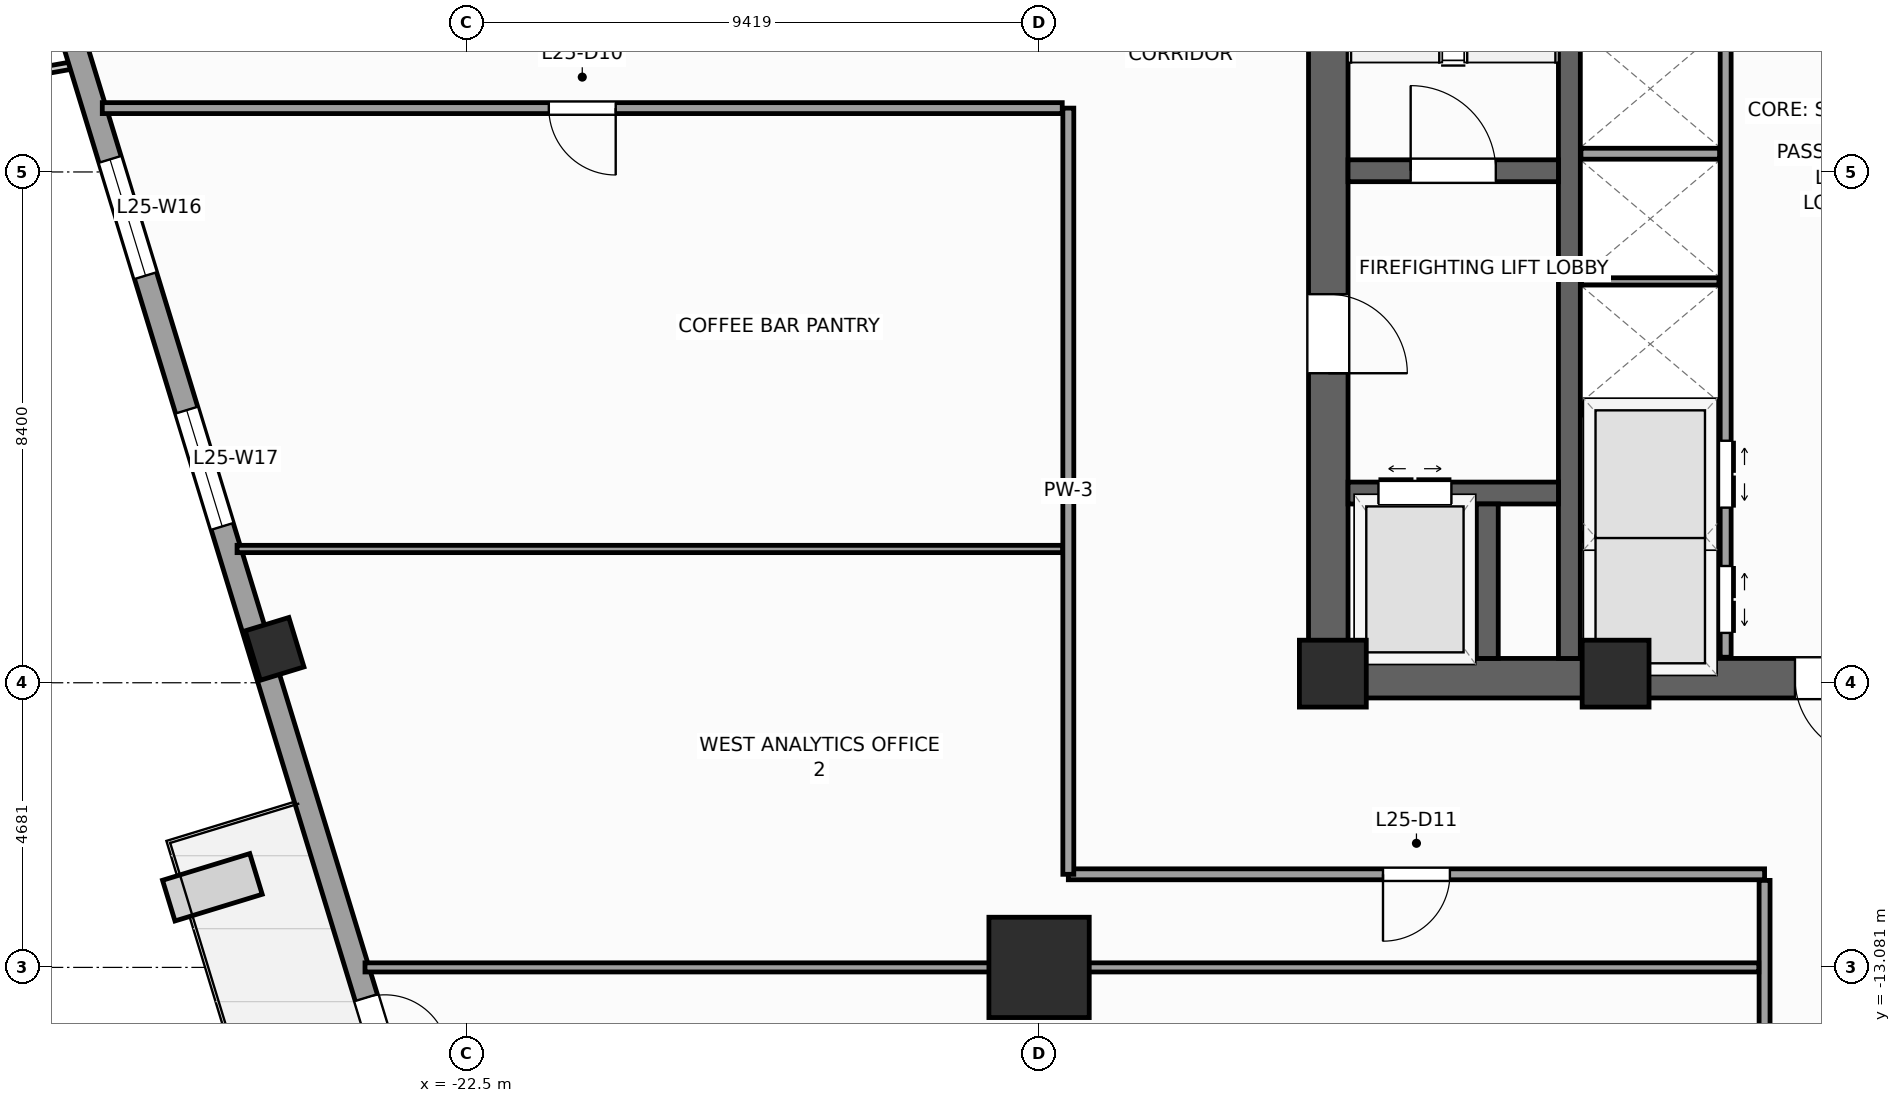
"""IFC4 building model, lengths in metres.
Left out: names, types, materials, properties, quantities, classifications, styles, units other than length and angle.
Written with IfcOpenShell. Run it as: python <this file> out.ifc"""

import sys

from ifc_helpers import new_model, si_unit, direction, frame, frame_2d, origin, origin_2d, place, context, subcontext, project, spatial, rectangle, extrude, source, transform, mapped, element, fill, save


model = new_model("IFC4")
c1 = context("Model", 3, precision=1e-05, world=origin(), true_north=direction((0.0, 1.0)))
c2 = subcontext(c1, "Body", "Model", "MODEL_VIEW")
j1 = project(units=[si_unit("LENGTHUNIT", "METRE"), si_unit("PLANEANGLEUNIT", "RADIAN")], contexts=[c1])
p1 = place(None, origin())
s1 = spatial("IfcSite", under=j1, at=p1, CompositionType="ELEMENT")
p2 = place(p1, origin())
s2 = spatial("IfcBuilding", under=s1, at=p2, CompositionType="ELEMENT")
p3 = place(p2, frame((0.0, 0.0, 107.2)))
s3 = spatial("IfcBuildingStorey", under=s2, at=p3, CompositionType="ELEMENT", Elevation=107.2)
p4 = place(p3, frame((-8.65, -8.325, 0.0), z_axis=(0.0, 0.0, 1.0), x_axis=(1.0, 0.0, 0.0)))
e1 = element("IfcWall", 1, at=p4, inside=s3, PredefinedType="SHEAR", context=c2, shape_type="SweptSolid", body=[
    extrude(rectangle(XDim=17.3, YDim=0.65, at=frame_2d((8.65, 0.0))), origin(), (0.0, 0.0, 1.0), 4.0),
])
p5 = place(p4, frame((8.0, 0.0, 0.0)))
e2 = element("IfcOpeningElement", 2, at=p5, cuts=e1, PredefinedType="OPENING", context=c2, shape_type="SweptSolid", body=[
    extrude(rectangle(XDim=1.3, YDim=2.2, at=frame_2d((0.65, 1.1))), frame((0.0, 0.335, 0.0), z_axis=(0.0, -1.0, 0.0), x_axis=(1.0, 0.0, 0.0)), (0.0, 0.0, 1.0), 0.67),
])
p6 = place(p3, frame((-8.325, -8.0, 0.0), z_axis=(0.0, 0.0, 1.0), x_axis=(0.0, 1.0, 0.0)))
e3 = element("IfcWall", 3, at=p6, inside=s3, PredefinedType="SHEAR", context=c2, shape_type="SweptSolid", body=[
    extrude(rectangle(XDim=16.0, YDim=0.65, at=frame_2d((8.0, 0.0))), origin(), (0.0, 0.0, 1.0), 4.0),
])
p7 = place(p6, frame((4.69, 0.0, 0.0)))
e4 = element("IfcOpeningElement", 4, at=p7, cuts=e3, PredefinedType="OPENING", context=c2, shape_type="SweptSolid", body=[
    extrude(rectangle(XDim=1.3, YDim=2.2, at=frame_2d((0.65, 1.1))), frame((0.0, 0.335, 0.0), z_axis=(0.0, -1.0, 0.0), x_axis=(1.0, 0.0, 0.0)), (0.0, 0.0, 1.0), 0.67),
])
p8 = place(p3, frame((-4.36, -8.0, 0.0), z_axis=(0.0, 0.0, 1.0), x_axis=(0.0, 1.0, 0.0)))
e5 = element("IfcWall", 5, at=p8, inside=s3, PredefinedType="SHEAR", context=c2, shape_type="SweptSolid", body=[
    extrude(rectangle(XDim=16.0, YDim=0.36, at=frame_2d((8.0, 0.0))), origin(), (0.0, 0.0, 1.0), 4.0),
])
p9 = place(p3, frame((-8.0, 0.02, 0.0), z_axis=(0.0, 0.0, 1.0), x_axis=(1.0, 0.0, 0.0)))
e6 = element("IfcWall", 6, at=p9, inside=s3, PredefinedType="SHEAR", context=c2, shape_type="SweptSolid", body=[
    extrude(rectangle(XDim=3.46, YDim=0.36, at=frame_2d((1.73, 0.0))), origin(), (0.0, 0.0, 1.0), 4.0),
])
p10 = place(p9, frame((1.03, 0.0, 0.0)))
e7 = element("IfcOpeningElement", 7, at=p10, cuts=e6, PredefinedType="OPENING", context=c2, shape_type="SweptSolid", body=[
    extrude(rectangle(XDim=1.4, YDim=2.2, at=frame_2d((0.7, 1.1))), frame((0.0, 0.19, 0.0), z_axis=(0.0, -1.0, 0.0), x_axis=(1.0, 0.0, 0.0)), (0.0, 0.0, 1.0), 0.38),
])
p11 = place(p3, frame((-8.0, -5.28, 0.0), z_axis=(0.0, 0.0, 1.0), x_axis=(1.0, 0.0, 0.0)))
e8 = element("IfcWall", 8, at=p11, inside=s3, PredefinedType="SHEAR", context=c2, shape_type="SweptSolid", body=[
    extrude(rectangle(XDim=3.46, YDim=0.36, at=frame_2d((1.73, 0.0))), origin(), (0.0, 0.0, 1.0), 4.0),
])
p12 = place(p11, frame((0.5, 0.0, 0.0)))
e9 = element("IfcOpeningElement", 9, at=p12, cuts=e8, PredefinedType="OPENING", context=c2, shape_type="SweptSolid", body=[
    extrude(rectangle(XDim=1.2, YDim=2.25, at=frame_2d((0.6, 1.125))), frame((0.0, 0.19, 0.0), z_axis=(0.0, -1.0, 0.0), x_axis=(1.0, 0.0, 0.0)), (0.0, 0.0, 1.0), 0.38),
])
p13 = place(p3, frame((-5.71, -8.0, 0.0), z_axis=(0.0, 0.0, 1.0), x_axis=(0.0, 1.0, 0.0)))
e10 = element("IfcWall", 10, at=p13, inside=s3, PredefinedType="SHEAR", context=c2, shape_type="SweptSolid", body=[
    extrude(rectangle(XDim=2.54, YDim=0.36, at=frame_2d((1.27, 0.0))), origin(), (0.0, 0.0, 1.0), 4.0),
])
m1 = source(origin(), c2, "Body", "SweptSolid", [
    extrude(rectangle(XDim=1.1, YDim=1.1, at=origin_2d()), origin(), (0.0, 0.0, 1.0), 4.0),
])
for number, where, z_axis, x_axis in (
    (11, (-8.25, -8.25, 0.0), (0.0, 0.0, 1.0), (1.0, 0.0, 0.0)),
    (12, (-3.6, -8.25, 0.0), (0.0, 0.0, 1.0), (1.0, 0.0, 0.0)),
):
    element("IfcColumn", number, at=place(p3, frame(where, z_axis=z_axis, x_axis=x_axis)), inside=s3, PredefinedType="PILASTER", context=c2, shape_type="MappedRepresentation", body=[
        mapped(m1, transform((0.0, 0.0, 0.0), scale=1.0)),
    ])
m2 = source(origin(), c2, "Body", "SweptSolid", [
    extrude(rectangle(XDim=1.65, YDim=1.65, at=origin_2d()), origin(), (0.0, 0.0, 1.0), 4.0),
])
p14 = place(p3, frame((-13.081, -13.081, 0.0), z_axis=(0.0, 0.0, 1.0), x_axis=(1.0, 0.0, 0.0)))
e13 = element("IfcColumn", 13, at=p14, inside=s3, PredefinedType="COLUMN", context=c2, shape_type="MappedRepresentation", body=[
    mapped(m2, transform((0.0, 0.0, 0.0), scale=1.0)),
])
m3 = source(origin(), c2, "Body", "SweptSolid", [
    extrude(rectangle(XDim=0.75, YDim=0.85, at=origin_2d()), origin(), (0.0, 0.0, 1.0), 4.0),
])
p15 = place(p3, frame((-25.653, -7.843, 0.0), z_axis=(0.0, 0.0, 1.0), x_axis=(0.956304755963, 0.292371704723, 0.0)))
e14 = element("IfcColumn", 14, at=p15, inside=s3, PredefinedType="COLUMN", context=c2, shape_type="MappedRepresentation", body=[
    mapped(m3, transform((0.0, 0.0, 0.0), scale=1.0)),
])
p16 = place(p3, frame((-32.658, 14.265, 0.0), z_axis=(0.0, 0.0, 1.0), x_axis=(0.292373127906, -0.956304320851, 0.0)))
e15 = element("IfcWall", 15, at=p16, inside=s3, PredefinedType="STANDARD", context=c2, shape_type="SweptSolid", body=[
    extrude(rectangle(XDim=46.38, YDim=0.38, at=frame_2d((23.19, 0.0))), origin(), (0.0, 0.0, 1.0), 3.14),
])
p17 = place(p16, frame((29.115, 0.0, 0.0)))
e16 = element("IfcOpeningElement", 16, at=p17, cuts=e15, PredefinedType="OPENING", context=c2, shape_type="SweptSolid", body=[
    extrude(rectangle(XDim=1.05, YDim=2.25, at=frame_2d((0.525, 1.125))), frame((0.0, 0.2, 0.0), z_axis=(0.0, -1.0, 0.0), x_axis=(1.0, 0.0, 0.0)), (0.0, 0.0, 1.0), 0.4),
])
p18 = place(p16, frame((4.865, 0.0, 0.51)))
e17 = element("IfcOpeningElement", 17, at=p18, cuts=e15, PredefinedType="OPENING", context=c2, shape_type="SweptSolid", body=[
    extrude(rectangle(XDim=1.4, YDim=2.4, at=frame_2d((0.7, 1.2))), frame((0.0, 0.2, 0.0), z_axis=(0.0, -1.0, 0.0), x_axis=(1.0, 0.0, 0.0)), (0.0, 0.0, 1.0), 0.4),
])
p19 = place(p16, frame((14.7, 0.0, 0.51)))
e18 = element("IfcOpeningElement", 18, at=p19, cuts=e15, PredefinedType="OPENING", context=c2, shape_type="SweptSolid", body=[
    extrude(rectangle(XDim=2.0, YDim=2.4, at=frame_2d((1.0, 1.2))), frame((0.0, 0.2, 0.0), z_axis=(0.0, -1.0, 0.0), x_axis=(1.0, 0.0, 0.0)), (0.0, 0.0, 1.0), 0.4),
])
p20 = place(p16, frame((19.012, 0.0, 0.51)))
e19 = element("IfcOpeningElement", 19, at=p20, cuts=e15, PredefinedType="OPENING", context=c2, shape_type="SweptSolid", body=[
    extrude(rectangle(XDim=2.0, YDim=2.4, at=frame_2d((1.0, 1.2))), frame((0.0, 0.2, 0.0), z_axis=(0.0, -1.0, 0.0), x_axis=(1.0, 0.0, 0.0)), (0.0, 0.0, 1.0), 0.4),
])
p21 = place(p16, frame((31.288, 0.0, 0.51)))
e20 = element("IfcOpeningElement", 20, at=p21, cuts=e15, PredefinedType="OPENING", context=c2, shape_type="SweptSolid", body=[
    extrude(rectangle(XDim=2.0, YDim=2.4, at=frame_2d((1.0, 1.2))), frame((0.0, 0.2, 0.0), z_axis=(0.0, -1.0, 0.0), x_axis=(1.0, 0.0, 0.0)), (0.0, 0.0, 1.0), 0.4),
])
p22 = place(p16, frame((39.187, 0.0, 0.51)))
e21 = element("IfcOpeningElement", 21, at=p22, cuts=e15, PredefinedType="OPENING", context=c2, shape_type="SweptSolid", body=[
    extrude(rectangle(XDim=1.4, YDim=2.4, at=frame_2d((0.7, 1.2))), frame((0.0, 0.2, 0.0), z_axis=(0.0, -1.0, 0.0), x_axis=(1.0, 0.0, 0.0)), (0.0, 0.0, 1.0), 0.4),
])
p23 = place(p3, frame((-1.79, -7.98, 0.0), z_axis=(0.0, 0.0, 1.0), x_axis=(0.0, 1.0, 0.0)))
e22 = element("IfcWall", 22, at=p23, inside=s3, PredefinedType="PARTITIONING", context=c2, shape_type="SweptSolid", body=[
    extrude(rectangle(XDim=12.38, YDim=0.18, at=frame_2d((6.19, 0.0))), origin(), (0.0, 0.0, 1.0), 3.74),
])
p24 = place(p23, frame((0.4, 0.0, 0.0)))
e23 = element("IfcOpeningElement", 23, at=p24, cuts=e22, PredefinedType="OPENING", context=c2, shape_type="SweptSolid", body=[
    extrude(rectangle(XDim=1.1, YDim=2.2, at=frame_2d((0.55, 1.1))), frame((0.0, 0.1, 0.0), z_axis=(0.0, -1.0, 0.0), x_axis=(1.0, 0.0, 0.0)), (0.0, 0.0, 1.0), 0.2),
])
p25 = place(p23, frame((2.46, 0.0, 0.0)))
e24 = element("IfcOpeningElement", 24, at=p25, cuts=e22, PredefinedType="OPENING", context=c2, shape_type="SweptSolid", body=[
    extrude(rectangle(XDim=1.1, YDim=2.2, at=frame_2d((0.55, 1.1))), frame((0.0, 0.1, 0.0), z_axis=(0.0, -1.0, 0.0), x_axis=(1.0, 0.0, 0.0)), (0.0, 0.0, 1.0), 0.2),
])
for number, where, z_axis, x_axis in (
    (25, (-4.17, -3.9, 0.0), (0.0, 0.0, 1.0), (1.0, 0.0, 0.0)),
    (26, (-4.17, 0.3, 0.0), (0.0, 0.0, 1.0), (1.0, 0.0, 0.0)),
):
    element("IfcWall", number, at=place(p3, frame(where, z_axis=z_axis, x_axis=x_axis)), inside=s3, PredefinedType="PARTITIONING", context=c2, shape_type="SweptSolid", body=[
        extrude(rectangle(XDim=2.28, YDim=0.18, at=frame_2d((1.14, 0.0))), origin(), (0.0, 0.0, 1.0), 3.74),
    ])
for number, where, z_axis, x_axis in (
    (27, (-4.16, -6.0, 0.0), (0.0, 0.0, 1.0), (1.0, 0.0, 0.0)),
    (28, (-4.16, -1.8, 0.0), (0.0, 0.0, 1.0), (1.0, 0.0, 0.0)),
):
    element("IfcWall", number, at=place(p3, frame(where, z_axis=z_axis, x_axis=x_axis)), inside=s3, PredefinedType="PARTITIONING", context=c2, shape_type="SweptSolid", body=[
        extrude(rectangle(XDim=2.26, YDim=0.12, at=frame_2d((1.13, 0.0))), origin(), (0.0, 0.0, 1.0), 3.74),
    ])
p26 = place(p3, frame((-12.6, -11.55, 0.0), z_axis=(0.0, 0.0, 1.0), x_axis=(1.0, 0.0, 0.0)))
e29 = element("IfcWall", 29, at=p26, inside=s3, PredefinedType="PARTITIONING", context=c2, shape_type="SweptSolid", body=[
    extrude(rectangle(XDim=11.45, YDim=0.18, at=frame_2d((5.725, 0.0))), origin(), (0.0, 0.0, 1.0), 3.74),
])
p27 = place(p26, frame((5.175, 0.0, 0.0)))
e30 = element("IfcOpeningElement", 30, at=p27, cuts=e29, PredefinedType="OPENING", context=c2, shape_type="SweptSolid", body=[
    extrude(rectangle(XDim=1.1, YDim=2.2, at=frame_2d((0.55, 1.1))), frame((0.0, 0.1, 0.0), z_axis=(0.0, -1.0, 0.0), x_axis=(1.0, 0.0, 0.0)), (0.0, 0.0, 1.0), 0.2),
])
p28 = place(p3, frame((-12.6, -11.55, 0.0), z_axis=(0.0, 0.0, 1.0), x_axis=(0.0, 1.0, 0.0)))
e31 = element("IfcWall", 31, at=p28, inside=s3, PredefinedType="PARTITIONING", context=c2, shape_type="SweptSolid", body=[
    extrude(rectangle(XDim=12.6, YDim=0.18, at=frame_2d((6.3, 0.0))), origin(), (0.0, 0.0, 1.0), 3.74),
])
p29 = place(p3, frame((-28.487, 1.05, 0.0), z_axis=(0.0, 0.0, 1.0), x_axis=(1.0, 0.0, 0.0)))
e32 = element("IfcWall", 32, at=p29, inside=s3, PredefinedType="PARTITIONING", context=c2, shape_type="SweptSolid", body=[
    extrude(rectangle(XDim=15.787, YDim=0.18, at=frame_2d((7.894, 0.0))), origin(), (0.0, 0.0, 1.0), 3.74),
])
p30 = place(p29, frame((7.343, 0.0, 0.0)))
e33 = element("IfcOpeningElement", 33, at=p30, cuts=e32, PredefinedType="OPENING", context=c2, shape_type="SweptSolid", body=[
    extrude(rectangle(XDim=1.1, YDim=2.2, at=frame_2d((0.55, 1.1))), frame((0.0, 0.1, 0.0), z_axis=(0.0, -1.0, 0.0), x_axis=(1.0, 0.0, 0.0)), (0.0, 0.0, 1.0), 0.2),
])
p31 = place(p3, frame((-1.15, -28.517, 0.0), z_axis=(0.0, 0.0, 1.0), x_axis=(0.0, 1.0, 0.0)))
e34 = element("IfcWall", 34, at=p31, inside=s3, PredefinedType="PARTITIONING", context=c2, shape_type="SweptSolid", body=[
    extrude(rectangle(XDim=16.867, YDim=0.18, at=frame_2d((8.434, 0.0))), origin(), (0.0, 0.0, 1.0), 3.74),
])
p32 = place(p31, frame((7.333, 0.0, 0.0)))
e35 = element("IfcOpeningElement", 35, at=p32, cuts=e34, PredefinedType="OPENING", context=c2, shape_type="SweptSolid", body=[
    extrude(rectangle(XDim=1.1, YDim=2.2, at=frame_2d((0.55, 1.1))), frame((0.0, 0.1, 0.0), z_axis=(0.0, -1.0, 0.0), x_axis=(1.0, 0.0, 0.0)), (0.0, 0.0, 1.0), 0.2),
])
p33 = place(p3, frame((-24.167, -13.081, 0.0), z_axis=(0.0, 0.0, 1.0), x_axis=(1.0, 0.0, 0.0)))
e36 = element("IfcWall", 36, at=p33, inside=s3, PredefinedType="PARTITIONING", context=c2, shape_type="SweptSolid", body=[
    extrude(rectangle(XDim=22.921, YDim=0.15, at=frame_2d((11.461, 0.0))), origin(), (0.0, 0.0, 1.0), 2.732),
])
p34 = place(p3, frame((-26.27, -6.2, 0.0), z_axis=(0.0, 0.0, 1.0), x_axis=(1.0, 0.0, 0.0)))
e37 = element("IfcWall", 37, at=p34, inside=s3, PredefinedType="PARTITIONING", context=c2, shape_type="SweptSolid", body=[
    extrude(rectangle(XDim=13.575, YDim=0.12, at=frame_2d((6.788, 0.0))), origin(), (0.0, 0.0, 1.0), 3.74),
])
m4 = source(origin(), c2, "Body", "SweptSolid", [
    extrude(rectangle(XDim=1.05, YDim=2.25, at=frame_2d((0.525, 1.125))), frame((0.0, 0.025, 0.0), z_axis=(0.0, -1.0, 0.0), x_axis=(1.0, 0.0, 0.0)), (0.0, 0.0, 1.0), 0.05),
])
p35 = place(p17, origin())
e38 = element("IfcDoor", 38, at=p35, inside=s3, OperationType="SINGLE_SWING_RIGHT", PredefinedType="DOOR", context=c2, shape_type="MappedRepresentation", body=[
    mapped(m4, transform((0.0, 0.0, 0.0), scale=1.0)),
])
fill(e16, e38)
m5 = source(origin(), c2, "Body", "SweptSolid", [
    extrude(rectangle(XDim=2.0, YDim=2.4, at=frame_2d((1.0, 1.2))), frame((0.0, 0.03, 0.0), z_axis=(0.0, -1.0, 0.0), x_axis=(1.0, 0.0, 0.0)), (0.0, 0.0, 1.0), 0.06),
])
p36 = place(p19, origin())
e39 = element("IfcWindow", 39, at=p36, inside=s3, PartitioningType="SINGLE_PANEL", PredefinedType="WINDOW", context=c2, shape_type="MappedRepresentation", body=[
    mapped(m5, transform((0.0, 0.0, 0.0), scale=1.0)),
])
fill(e18, e39)
p37 = place(p20, origin())
e40 = element("IfcWindow", 40, at=p37, inside=s3, PartitioningType="SINGLE_PANEL", PredefinedType="WINDOW", context=c2, shape_type="MappedRepresentation", body=[
    mapped(m5, transform((0.0, 0.0, 0.0), scale=1.0)),
])
fill(e19, e40)
m6 = source(origin(), c2, "Body", "SweptSolid", [
    extrude(rectangle(XDim=1.4, YDim=2.2, at=frame_2d((0.7, 1.1))), frame((0.0, 0.025, 0.0), z_axis=(0.0, -1.0, 0.0), x_axis=(1.0, 0.0, 0.0)), (0.0, 0.0, 1.0), 0.05),
])
p38 = place(p10, origin())
e41 = element("IfcDoor", 41, at=p38, inside=s3, OperationType="SINGLE_SWING_LEFT", PredefinedType="DOOR", context=c2, shape_type="MappedRepresentation", body=[
    mapped(m6, transform((0.0, 0.0, 0.0), scale=1.0)),
])
fill(e7, e41)
m7 = source(origin(), c2, "Body", "SweptSolid", [
    extrude(rectangle(XDim=1.3, YDim=2.2, at=frame_2d((0.65, 1.1))), frame((0.0, 0.025, 0.0), z_axis=(0.0, -1.0, 0.0), x_axis=(1.0, 0.0, 0.0)), (0.0, 0.0, 1.0), 0.05),
])
p39 = place(p7, frame((1.3, 0.0, 0.0), z_axis=(0.0, 0.0, 1.0), x_axis=(-1.0, 0.0, 0.0)))
e42 = element("IfcDoor", 42, at=p39, inside=s3, OperationType="SINGLE_SWING_LEFT", PredefinedType="DOOR", context=c2, shape_type="MappedRepresentation", body=[
    mapped(m7, transform((0.0, 0.0, 0.0), scale=1.0)),
])
fill(e4, e42)
p40 = place(p5, frame((1.3, 0.0, 0.0), z_axis=(0.0, 0.0, 1.0), x_axis=(-1.0, 0.0, 0.0)))
e43 = element("IfcDoor", 43, at=p40, inside=s3, OperationType="SINGLE_SWING_RIGHT", PredefinedType="DOOR", context=c2, shape_type="MappedRepresentation", body=[
    mapped(m7, transform((0.0, 0.0, 0.0), scale=1.0)),
])
fill(e2, e43)
m8 = source(origin(), c2, "Body", "SweptSolid", [
    extrude(rectangle(XDim=1.2, YDim=2.25, at=frame_2d((0.6, 1.125))), frame((0.0, 0.025, 0.0), z_axis=(0.0, -1.0, 0.0), x_axis=(1.0, 0.0, 0.0)), (0.0, 0.0, 1.0), 0.05),
])
p41 = place(p12, origin())
e44 = element("IfcDoor", 44, at=p41, inside=s3, OperationType="DOUBLE_DOOR_SLIDING", PredefinedType="DOOR", context=c2, shape_type="MappedRepresentation", body=[
    mapped(m8, transform((0.0, 0.0, 0.0), scale=1.0)),
])
fill(e9, e44)
m9 = source(origin(), c2, "Body", "SweptSolid", [
    extrude(rectangle(XDim=1.1, YDim=2.2, at=frame_2d((0.55, 1.1))), frame((0.0, 0.025, 0.0), z_axis=(0.0, -1.0, 0.0), x_axis=(1.0, 0.0, 0.0)), (0.0, 0.0, 1.0), 0.05),
])
p42 = place(p24, frame((1.1, 0.0, 0.0), z_axis=(0.0, 0.0, 1.0), x_axis=(-1.0, 0.0, 0.0)))
e45 = element("IfcDoor", 45, at=p42, inside=s3, OperationType="DOUBLE_DOOR_SLIDING", PredefinedType="DOOR", context=c2, shape_type="MappedRepresentation", body=[
    mapped(m9, transform((0.0, 0.0, 0.0), scale=1.0)),
])
fill(e23, e45)
p43 = place(p25, frame((1.1, 0.0, 0.0), z_axis=(0.0, 0.0, 1.0), x_axis=(-1.0, 0.0, 0.0)))
e46 = element("IfcDoor", 46, at=p43, inside=s3, OperationType="DOUBLE_DOOR_SLIDING", PredefinedType="DOOR", context=c2, shape_type="MappedRepresentation", body=[
    mapped(m9, transform((0.0, 0.0, 0.0), scale=1.0)),
])
fill(e24, e46)
p44 = place(p30, frame((1.1, 0.0, 0.0), z_axis=(0.0, 0.0, 1.0), x_axis=(-1.0, 0.0, 0.0)))
e47 = element("IfcDoor", 47, at=p44, inside=s3, OperationType="SINGLE_SWING_RIGHT", PredefinedType="DOOR", context=c2, shape_type="MappedRepresentation", body=[
    mapped(m9, transform((0.0, 0.0, 0.0), scale=1.0)),
])
fill(e33, e47)
p45 = place(p27, frame((1.1, 0.0, 0.0), z_axis=(0.0, 0.0, 1.0), x_axis=(-1.0, 0.0, 0.0)))
e48 = element("IfcDoor", 48, at=p45, inside=s3, OperationType="SINGLE_SWING_LEFT", PredefinedType="DOOR", context=c2, shape_type="MappedRepresentation", body=[
    mapped(m9, transform((0.0, 0.0, 0.0), scale=1.0)),
])
fill(e30, e48)
save(model, sys.argv[1])
